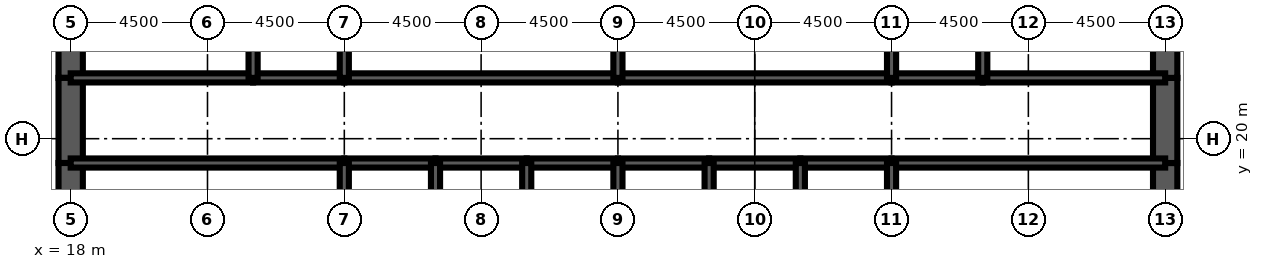
"""IFC4 building model, lengths in metres.
Left out: names, types, materials, properties, quantities, classifications, styles, units other than length and angle.
Written with IfcOpenShell. Run it as: python <this file> out.ifc"""

import sys

from ifc_helpers import new_model, si_unit, direction, frame, frame_2d, origin, place, context, subcontext, project, spatial, rectangle, extrude, element, fill, save


model = new_model("IFC4")
c1 = context("Model", 3, precision=1e-05, world=origin(), true_north=direction((0.0, 1.0)))
c2 = subcontext(c1, "Body", "Model", "MODEL_VIEW")
j1 = project(units=[si_unit("LENGTHUNIT", "METRE"), si_unit("PLANEANGLEUNIT", "RADIAN")], contexts=[c1])
p1 = place(None, origin())
s1 = spatial("IfcSite", under=j1, at=p1, CompositionType="ELEMENT")
p2 = place(p1, origin())
s2 = spatial("IfcBuilding", under=s1, at=p2, CompositionType="ELEMENT")
p3 = place(p2, frame((0.0, 0.0, 257.2)))
s3 = spatial("IfcBuildingStorey", under=s2, at=p3, CompositionType="ELEMENT", Elevation=257.2)
p4 = place(p3, frame((18.0, 26.0, 0.0), z_axis=(0.0, 0.0, 1.0), x_axis=(0.0, -1.0, 0.0)))
e1 = element("IfcWall", 1, at=p4, inside=s3, PredefinedType="SHEAR", context=c2, shape_type="SweptSolid", body=[
    extrude(rectangle(XDim=4.0, YDim=0.8, at=frame_2d((2.0, 0.0))), origin(), (0.0, 0.0, 1.0), 4.2),
])
p5 = place(p3, frame((18.0, 22.0, 0.0), z_axis=(0.0, 0.0, 1.0), x_axis=(0.0, -1.0, 0.0)))
e2 = element("IfcWall", 2, at=p5, inside=s3, PredefinedType="SHEAR", context=c2, shape_type="SweptSolid", body=[
    extrude(rectangle(XDim=2.8, YDim=0.8, at=frame_2d((1.4, 0.0))), origin(), (0.0, 0.0, 1.0), 4.2),
])
p6 = place(p5, frame((0.6, 0.0, 0.0)))
e3 = element("IfcOpeningElement", 3, at=p6, cuts=e2, PredefinedType="OPENING", context=c2, shape_type="SweptSolid", body=[
    extrude(rectangle(XDim=1.8, YDim=2.1, at=frame_2d((0.9, 1.05))), frame((0.0, 0.41, 0.0), z_axis=(0.0, -1.0, 0.0), x_axis=(1.0, 0.0, 0.0)), (0.0, 0.0, 1.0), 0.82),
])
for number, where, z_axis, x_axis in (
    (4, (18.0, 19.2, 0.0), (0.0, 0.0, 1.0), (0.0, -1.0, 0.0)),
    (5, (54.0, 16.0, 0.0), (0.0, 0.0, 1.0), (0.0, 1.0, 0.0)),
):
    element("IfcWall", number, at=place(p3, frame(where, z_axis=z_axis, x_axis=x_axis)), inside=s3, PredefinedType="SHEAR", context=c2, shape_type="SweptSolid", body=[
        extrude(rectangle(XDim=3.2, YDim=0.8, at=frame_2d((1.6, 0.0))), origin(), (0.0, 0.0, 1.0), 4.2),
    ])
p7 = place(p3, frame((54.0, 19.2, 0.0), z_axis=(0.0, 0.0, 1.0), x_axis=(0.0, 1.0, 0.0)))
e6 = element("IfcWall", 6, at=p7, inside=s3, PredefinedType="SHEAR", context=c2, shape_type="SweptSolid", body=[
    extrude(rectangle(XDim=2.8, YDim=0.8, at=frame_2d((1.4, 0.0))), origin(), (0.0, 0.0, 1.0), 4.2),
])
p8 = place(p7, frame((0.4, 0.0, 0.0)))
e7 = element("IfcOpeningElement", 7, at=p8, cuts=e6, PredefinedType="OPENING", context=c2, shape_type="SweptSolid", body=[
    extrude(rectangle(XDim=1.8, YDim=2.1, at=frame_2d((0.9, 1.05))), frame((0.0, 0.41, 0.0), z_axis=(0.0, -1.0, 0.0), x_axis=(1.0, 0.0, 0.0)), (0.0, 0.0, 1.0), 0.82),
])
p9 = place(p3, frame((54.0, 22.0, 0.0), z_axis=(0.0, 0.0, 1.0), x_axis=(0.0, 1.0, 0.0)))
e8 = element("IfcWall", 8, at=p9, inside=s3, PredefinedType="SHEAR", context=c2, shape_type="SweptSolid", body=[
    extrude(rectangle(XDim=4.0, YDim=0.8, at=frame_2d((2.0, 0.0))), origin(), (0.0, 0.0, 1.0), 4.2),
])
p10 = place(p3, frame((18.0, 19.2, 0.0), z_axis=(0.0, 0.0, 1.0), x_axis=(1.0, 0.0, 0.0)))
e9 = element("IfcWall", 9, at=p10, inside=s3, PredefinedType="SOLIDWALL", context=c2, shape_type="SweptSolid", body=[
    extrude(rectangle(XDim=9.0, YDim=0.3, at=frame_2d((4.5, 0.0))), origin(), (0.0, 0.0, 1.0), 4.2),
])
p11 = place(p10, frame((0.65, 0.0, 0.0)))
e10 = element("IfcOpeningElement", 10, at=p11, cuts=e9, PredefinedType="OPENING", context=c2, shape_type="SweptSolid", body=[
    extrude(rectangle(XDim=1.0, YDim=2.1, at=frame_2d((0.5, 1.05))), frame((0.0, 0.16, 0.0), z_axis=(0.0, -1.0, 0.0), x_axis=(1.0, 0.0, 0.0)), (0.0, 0.0, 1.0), 0.32),
])
p12 = place(p3, frame((27.0, 19.2, 0.0), z_axis=(0.0, 0.0, 1.0), x_axis=(1.0, 0.0, 0.0)))
e11 = element("IfcWall", 11, at=p12, inside=s3, PredefinedType="SOLIDWALL", context=c2, shape_type="SweptSolid", body=[
    extrude(rectangle(XDim=3.0, YDim=0.3, at=frame_2d((1.5, 0.0))), origin(), (0.0, 0.0, 1.0), 4.2),
])
p13 = place(p12, frame((0.95, 0.0, 0.0)))
e12 = element("IfcOpeningElement", 12, at=p13, cuts=e11, PredefinedType="OPENING", context=c2, shape_type="SweptSolid", body=[
    extrude(rectangle(XDim=1.1, YDim=2.2, at=frame_2d((0.55, 1.1))), frame((0.0, 0.16, 0.0), z_axis=(0.0, -1.0, 0.0), x_axis=(1.0, 0.0, 0.0)), (0.0, 0.0, 1.0), 0.32),
])
p14 = place(p3, frame((30.0, 19.2, 0.0), z_axis=(0.0, 0.0, 1.0), x_axis=(1.0, 0.0, 0.0)))
e13 = element("IfcWall", 13, at=p14, inside=s3, PredefinedType="SOLIDWALL", context=c2, shape_type="SweptSolid", body=[
    extrude(rectangle(XDim=3.0, YDim=0.3, at=frame_2d((1.5, 0.0))), origin(), (0.0, 0.0, 1.0), 4.2),
])
p15 = place(p14, frame((0.95, 0.0, 0.0)))
e14 = element("IfcOpeningElement", 14, at=p15, cuts=e13, PredefinedType="OPENING", context=c2, shape_type="SweptSolid", body=[
    extrude(rectangle(XDim=1.1, YDim=2.2, at=frame_2d((0.55, 1.1))), frame((0.0, 0.16, 0.0), z_axis=(0.0, -1.0, 0.0), x_axis=(1.0, 0.0, 0.0)), (0.0, 0.0, 1.0), 0.32),
])
p16 = place(p3, frame((33.0, 19.2, 0.0), z_axis=(0.0, 0.0, 1.0), x_axis=(1.0, 0.0, 0.0)))
e15 = element("IfcWall", 15, at=p16, inside=s3, PredefinedType="SOLIDWALL", context=c2, shape_type="SweptSolid", body=[
    extrude(rectangle(XDim=3.0, YDim=0.3, at=frame_2d((1.5, 0.0))), origin(), (0.0, 0.0, 1.0), 4.2),
])
p17 = place(p16, frame((0.95, 0.0, 0.0)))
e16 = element("IfcOpeningElement", 16, at=p17, cuts=e15, PredefinedType="OPENING", context=c2, shape_type="SweptSolid", body=[
    extrude(rectangle(XDim=1.1, YDim=2.2, at=frame_2d((0.55, 1.1))), frame((0.0, 0.16, 0.0), z_axis=(0.0, -1.0, 0.0), x_axis=(1.0, 0.0, 0.0)), (0.0, 0.0, 1.0), 0.32),
])
p18 = place(p3, frame((36.0, 19.2, 0.0), z_axis=(0.0, 0.0, 1.0), x_axis=(1.0, 0.0, 0.0)))
e17 = element("IfcWall", 17, at=p18, inside=s3, PredefinedType="SOLIDWALL", context=c2, shape_type="SweptSolid", body=[
    extrude(rectangle(XDim=3.0, YDim=0.3, at=frame_2d((1.5, 0.0))), origin(), (0.0, 0.0, 1.0), 4.2),
])
p19 = place(p18, frame((0.95, 0.0, 0.0)))
e18 = element("IfcOpeningElement", 18, at=p19, cuts=e17, PredefinedType="OPENING", context=c2, shape_type="SweptSolid", body=[
    extrude(rectangle(XDim=1.1, YDim=2.2, at=frame_2d((0.55, 1.1))), frame((0.0, 0.16, 0.0), z_axis=(0.0, -1.0, 0.0), x_axis=(1.0, 0.0, 0.0)), (0.0, 0.0, 1.0), 0.32),
])
p20 = place(p3, frame((39.0, 19.2, 0.0), z_axis=(0.0, 0.0, 1.0), x_axis=(1.0, 0.0, 0.0)))
e19 = element("IfcWall", 19, at=p20, inside=s3, PredefinedType="SOLIDWALL", context=c2, shape_type="SweptSolid", body=[
    extrude(rectangle(XDim=3.0, YDim=0.3, at=frame_2d((1.5, 0.0))), origin(), (0.0, 0.0, 1.0), 4.2),
])
p21 = place(p20, frame((1.0, 0.0, 0.0)))
e20 = element("IfcOpeningElement", 20, at=p21, cuts=e19, PredefinedType="OPENING", context=c2, shape_type="SweptSolid", body=[
    extrude(rectangle(XDim=1.0, YDim=2.1, at=frame_2d((0.5, 1.05))), frame((0.0, 0.16, 0.0), z_axis=(0.0, -1.0, 0.0), x_axis=(1.0, 0.0, 0.0)), (0.0, 0.0, 1.0), 0.32),
])
p22 = place(p3, frame((42.0, 19.2, 0.0), z_axis=(0.0, 0.0, 1.0), x_axis=(1.0, 0.0, 0.0)))
e21 = element("IfcWall", 21, at=p22, inside=s3, PredefinedType="SOLIDWALL", context=c2, shape_type="SweptSolid", body=[
    extrude(rectangle(XDim=3.0, YDim=0.3, at=frame_2d((1.5, 0.0))), origin(), (0.0, 0.0, 1.0), 4.2),
])
p23 = place(p22, frame((1.0, 0.0, 0.0)))
e22 = element("IfcOpeningElement", 22, at=p23, cuts=e21, PredefinedType="OPENING", context=c2, shape_type="SweptSolid", body=[
    extrude(rectangle(XDim=1.0, YDim=2.1, at=frame_2d((0.5, 1.05))), frame((0.0, 0.16, 0.0), z_axis=(0.0, -1.0, 0.0), x_axis=(1.0, 0.0, 0.0)), (0.0, 0.0, 1.0), 0.32),
])
p24 = place(p3, frame((45.0, 19.2, 0.0), z_axis=(0.0, 0.0, 1.0), x_axis=(1.0, 0.0, 0.0)))
e23 = element("IfcWall", 23, at=p24, inside=s3, PredefinedType="SOLIDWALL", context=c2, shape_type="SweptSolid", body=[
    extrude(rectangle(XDim=9.0, YDim=0.3, at=frame_2d((4.5, 0.0))), origin(), (0.0, 0.0, 1.0), 4.2),
])
p25 = place(p24, frame((7.35, 0.0, 0.0)))
e24 = element("IfcOpeningElement", 24, at=p25, cuts=e23, PredefinedType="OPENING", context=c2, shape_type="SweptSolid", body=[
    extrude(rectangle(XDim=1.0, YDim=2.1, at=frame_2d((0.5, 1.05))), frame((0.0, 0.16, 0.0), z_axis=(0.0, -1.0, 0.0), x_axis=(1.0, 0.0, 0.0)), (0.0, 0.0, 1.0), 0.32),
])
p26 = place(p3, frame((18.0, 22.0, 0.0), z_axis=(0.0, 0.0, 1.0), x_axis=(1.0, 0.0, 0.0)))
e25 = element("IfcWall", 25, at=p26, inside=s3, PredefinedType="SOLIDWALL", context=c2, shape_type="SweptSolid", body=[
    extrude(rectangle(XDim=6.0, YDim=0.3, at=frame_2d((3.0, 0.0))), origin(), (0.0, 0.0, 1.0), 4.2),
])
p27 = place(p26, frame((4.4, 0.0, 0.0)))
e26 = element("IfcOpeningElement", 26, at=p27, cuts=e25, PredefinedType="OPENING", context=c2, shape_type="SweptSolid", body=[
    extrude(rectangle(XDim=1.0, YDim=2.1, at=frame_2d((0.5, 1.05))), frame((0.0, 0.16, 0.0), z_axis=(0.0, -1.0, 0.0), x_axis=(1.0, 0.0, 0.0)), (0.0, 0.0, 1.0), 0.32),
])
p28 = place(p26, frame((0.8, 0.0, 0.0)))
e27 = element("IfcOpeningElement", 27, at=p28, cuts=e25, PredefinedType="OPENING", context=c2, shape_type="SweptSolid", body=[
    extrude(rectangle(XDim=1.0, YDim=2.1, at=frame_2d((0.5, 1.05))), frame((0.0, 0.16, 0.0), z_axis=(0.0, -1.0, 0.0), x_axis=(1.0, 0.0, 0.0)), (0.0, 0.0, 1.0), 0.32),
])
p29 = place(p3, frame((24.0, 22.0, 0.0), z_axis=(0.0, 0.0, 1.0), x_axis=(1.0, 0.0, 0.0)))
e28 = element("IfcWall", 28, at=p29, inside=s3, PredefinedType="SOLIDWALL", context=c2, shape_type="SweptSolid", body=[
    extrude(rectangle(XDim=3.0, YDim=0.3, at=frame_2d((1.5, 0.0))), origin(), (0.0, 0.0, 1.0), 4.2),
])
p30 = place(p29, frame((1.0, 0.0, 0.0)))
e29 = element("IfcOpeningElement", 29, at=p30, cuts=e28, PredefinedType="OPENING", context=c2, shape_type="SweptSolid", body=[
    extrude(rectangle(XDim=1.0, YDim=2.1, at=frame_2d((0.5, 1.05))), frame((0.0, 0.16, 0.0), z_axis=(0.0, -1.0, 0.0), x_axis=(1.0, 0.0, 0.0)), (0.0, 0.0, 1.0), 0.32),
])
p31 = place(p3, frame((27.0, 22.0, 0.0), z_axis=(0.0, 0.0, 1.0), x_axis=(1.0, 0.0, 0.0)))
e30 = element("IfcWall", 30, at=p31, inside=s3, PredefinedType="SOLIDWALL", context=c2, shape_type="SweptSolid", body=[
    extrude(rectangle(XDim=9.0, YDim=0.3, at=frame_2d((4.5, 0.0))), origin(), (0.0, 0.0, 1.0), 4.2),
])
p32 = place(p31, frame((4.0, 0.0, 0.0)))
e31 = element("IfcOpeningElement", 31, at=p32, cuts=e30, PredefinedType="OPENING", context=c2, shape_type="SweptSolid", body=[
    extrude(rectangle(XDim=1.0, YDim=2.1, at=frame_2d((0.5, 1.05))), frame((0.0, 0.16, 0.0), z_axis=(0.0, -1.0, 0.0), x_axis=(1.0, 0.0, 0.0)), (0.0, 0.0, 1.0), 0.32),
])
p33 = place(p3, frame((36.0, 22.0, 0.0), z_axis=(0.0, 0.0, 1.0), x_axis=(1.0, 0.0, 0.0)))
e32 = element("IfcWall", 32, at=p33, inside=s3, PredefinedType="SOLIDWALL", context=c2, shape_type="SweptSolid", body=[
    extrude(rectangle(XDim=9.0, YDim=0.3, at=frame_2d((4.5, 0.0))), origin(), (0.0, 0.0, 1.0), 4.2),
])
p34 = place(p33, frame((4.0, 0.0, 0.0)))
e33 = element("IfcOpeningElement", 33, at=p34, cuts=e32, PredefinedType="OPENING", context=c2, shape_type="SweptSolid", body=[
    extrude(rectangle(XDim=1.0, YDim=2.1, at=frame_2d((0.5, 1.05))), frame((0.0, 0.16, 0.0), z_axis=(0.0, -1.0, 0.0), x_axis=(1.0, 0.0, 0.0)), (0.0, 0.0, 1.0), 0.32),
])
p35 = place(p3, frame((45.0, 22.0, 0.0), z_axis=(0.0, 0.0, 1.0), x_axis=(1.0, 0.0, 0.0)))
e34 = element("IfcWall", 34, at=p35, inside=s3, PredefinedType="SOLIDWALL", context=c2, shape_type="SweptSolid", body=[
    extrude(rectangle(XDim=3.0, YDim=0.3, at=frame_2d((1.5, 0.0))), origin(), (0.0, 0.0, 1.0), 4.2),
])
p36 = place(p35, frame((1.0, 0.0, 0.0)))
e35 = element("IfcOpeningElement", 35, at=p36, cuts=e34, PredefinedType="OPENING", context=c2, shape_type="SweptSolid", body=[
    extrude(rectangle(XDim=1.0, YDim=2.1, at=frame_2d((0.5, 1.05))), frame((0.0, 0.16, 0.0), z_axis=(0.0, -1.0, 0.0), x_axis=(1.0, 0.0, 0.0)), (0.0, 0.0, 1.0), 0.32),
])
p37 = place(p3, frame((48.0, 22.0, 0.0), z_axis=(0.0, 0.0, 1.0), x_axis=(1.0, 0.0, 0.0)))
e36 = element("IfcWall", 36, at=p37, inside=s3, PredefinedType="SOLIDWALL", context=c2, shape_type="SweptSolid", body=[
    extrude(rectangle(XDim=6.0, YDim=0.3, at=frame_2d((3.0, 0.0))), origin(), (0.0, 0.0, 1.0), 4.2),
])
p38 = place(p37, frame((2.0, 0.0, 0.0)))
e37 = element("IfcOpeningElement", 37, at=p38, cuts=e36, PredefinedType="OPENING", context=c2, shape_type="SweptSolid", body=[
    extrude(rectangle(XDim=1.0, YDim=2.1, at=frame_2d((0.5, 1.05))), frame((0.0, 0.16, 0.0), z_axis=(0.0, -1.0, 0.0), x_axis=(1.0, 0.0, 0.0)), (0.0, 0.0, 1.0), 0.32),
])
p39 = place(p37, frame((4.05, 0.0, 0.0)))
e38 = element("IfcOpeningElement", 38, at=p39, cuts=e36, PredefinedType="OPENING", context=c2, shape_type="SweptSolid", body=[
    extrude(rectangle(XDim=1.0, YDim=2.1, at=frame_2d((0.5, 1.05))), frame((0.0, 0.16, 0.0), z_axis=(0.0, -1.0, 0.0), x_axis=(1.0, 0.0, 0.0)), (0.0, 0.0, 1.0), 0.32),
])
for number, where, z_axis, x_axis in (
    (39, (27.0, 16.0, 0.0), (0.0, 0.0, 1.0), (0.0, 1.0, 0.0)),
    (40, (30.0, 16.0, 0.0), (0.0, 0.0, 1.0), (0.0, 1.0, 0.0)),
    (41, (33.0, 16.0, 0.0), (0.0, 0.0, 1.0), (0.0, 1.0, 0.0)),
    (42, (36.0, 16.0, 0.0), (0.0, 0.0, 1.0), (0.0, 1.0, 0.0)),
    (43, (39.0, 16.0, 0.0), (0.0, 0.0, 1.0), (0.0, 1.0, 0.0)),
    (44, (42.0, 16.0, 0.0), (0.0, 0.0, 1.0), (0.0, 1.0, 0.0)),
    (45, (45.0, 16.0, 0.0), (0.0, 0.0, 1.0), (0.0, 1.0, 0.0)),
):
    element("IfcWall", number, at=place(p3, frame(where, z_axis=z_axis, x_axis=x_axis)), inside=s3, PredefinedType="SOLIDWALL", context=c2, shape_type="SweptSolid", body=[
        extrude(rectangle(XDim=3.2, YDim=0.3, at=frame_2d((1.6, 0.0))), origin(), (0.0, 0.0, 1.0), 4.2),
    ])
for number, where, z_axis, x_axis in (
    (46, (24.0, 22.0, 0.0), (0.0, 0.0, 1.0), (0.0, 1.0, 0.0)),
    (47, (27.0, 22.0, 0.0), (0.0, 0.0, 1.0), (0.0, 1.0, 0.0)),
    (48, (36.0, 22.0, 0.0), (0.0, 0.0, 1.0), (0.0, 1.0, 0.0)),
    (49, (45.0, 22.0, 0.0), (0.0, 0.0, 1.0), (0.0, 1.0, 0.0)),
    (50, (48.0, 22.0, 0.0), (0.0, 0.0, 1.0), (0.0, 1.0, 0.0)),
):
    element("IfcWall", number, at=place(p3, frame(where, z_axis=z_axis, x_axis=x_axis)), inside=s3, PredefinedType="SOLIDWALL", context=c2, shape_type="SweptSolid", body=[
        extrude(rectangle(XDim=4.0, YDim=0.3, at=frame_2d((2.0, 0.0))), origin(), (0.0, 0.0, 1.0), 4.2),
    ])
p40 = place(p3, frame((38.0, 22.15, 0.0), z_axis=(0.0, 0.0, 1.0), x_axis=(0.0, 1.0, 0.0)))
e51 = element("IfcWall", 51, at=p40, inside=s3, PredefinedType="PARTITIONING", context=c2, shape_type="SweptSolid", body=[
    extrude(rectangle(XDim=3.7, YDim=0.15, at=frame_2d((1.85, 0.0))), origin(), (0.0, 0.0, 1.0), 3.0),
])
p41 = place(p40, frame((2.2, 0.0, 0.0)))
e52 = element("IfcOpeningElement", 52, at=p41, cuts=e51, PredefinedType="OPENING", context=c2, shape_type="SweptSolid", body=[
    extrude(rectangle(XDim=1.0, YDim=2.1, at=frame_2d((0.5, 1.05))), frame((0.0, 0.085, 0.0), z_axis=(0.0, -1.0, 0.0), x_axis=(1.0, 0.0, 0.0)), (0.0, 0.0, 1.0), 0.17),
])
for number, where, z_axis, x_axis in (
    (53, (20.275, 22.15, 0.0), (0.0, 0.0, 1.0), (0.0, 1.0, 0.0)),
    (54, (51.425, 22.15, 0.0), (0.0, 0.0, 1.0), (0.0, 1.0, 0.0)),
):
    element("IfcWall", number, at=place(p3, frame(where, z_axis=z_axis, x_axis=x_axis)), inside=s3, PredefinedType="PARTITIONING", context=c2, shape_type="SweptSolid", body=[
        extrude(rectangle(XDim=3.7, YDim=0.15, at=frame_2d((1.85, 0.0))), origin(), (0.0, 0.0, 1.0), 3.0),
    ])
p42 = place(p13, origin())
e55 = element("IfcDoor", 55, at=p42, inside=s3, OperationType="DOUBLE_DOOR_SLIDING", PredefinedType="USERDEFINED", context=c2, shape_type="SweptSolid", body=[
    extrude(rectangle(XDim=1.1, YDim=2.2, at=frame_2d((0.55, 1.1))), frame((0.0, 0.025, 0.0), z_axis=(0.0, -1.0, 0.0), x_axis=(1.0, 0.0, 0.0)), (0.0, 0.0, 1.0), 0.05),
])
fill(e12, e55)
p43 = place(p15, origin())
e56 = element("IfcDoor", 56, at=p43, inside=s3, OperationType="DOUBLE_DOOR_SLIDING", PredefinedType="USERDEFINED", context=c2, shape_type="SweptSolid", body=[
    extrude(rectangle(XDim=1.1, YDim=2.2, at=frame_2d((0.55, 1.1))), frame((0.0, 0.025, 0.0), z_axis=(0.0, -1.0, 0.0), x_axis=(1.0, 0.0, 0.0)), (0.0, 0.0, 1.0), 0.05),
])
fill(e14, e56)
p44 = place(p17, origin())
e57 = element("IfcDoor", 57, at=p44, inside=s3, OperationType="DOUBLE_DOOR_SLIDING", PredefinedType="USERDEFINED", context=c2, shape_type="SweptSolid", body=[
    extrude(rectangle(XDim=1.1, YDim=2.2, at=frame_2d((0.55, 1.1))), frame((0.0, 0.025, 0.0), z_axis=(0.0, -1.0, 0.0), x_axis=(1.0, 0.0, 0.0)), (0.0, 0.0, 1.0), 0.05),
])
fill(e16, e57)
p45 = place(p19, origin())
e58 = element("IfcDoor", 58, at=p45, inside=s3, OperationType="DOUBLE_DOOR_SLIDING", PredefinedType="USERDEFINED", context=c2, shape_type="SweptSolid", body=[
    extrude(rectangle(XDim=1.1, YDim=2.2, at=frame_2d((0.55, 1.1))), frame((0.0, 0.025, 0.0), z_axis=(0.0, -1.0, 0.0), x_axis=(1.0, 0.0, 0.0)), (0.0, 0.0, 1.0), 0.05),
])
fill(e18, e58)
p46 = place(p11, origin())
e59 = element("IfcDoor", 59, at=p46, inside=s3, OperationType="SINGLE_SWING_LEFT", PredefinedType="DOOR", context=c2, shape_type="SweptSolid", body=[
    extrude(rectangle(XDim=1.0, YDim=2.1, at=frame_2d((0.5, 1.05))), frame((0.0, 0.025, 0.0), z_axis=(0.0, -1.0, 0.0), x_axis=(1.0, 0.0, 0.0)), (0.0, 0.0, 1.0), 0.05),
])
fill(e10, e59)
p47 = place(p25, origin())
e60 = element("IfcDoor", 60, at=p47, inside=s3, OperationType="SINGLE_SWING_RIGHT", PredefinedType="DOOR", context=c2, shape_type="SweptSolid", body=[
    extrude(rectangle(XDim=1.0, YDim=2.1, at=frame_2d((0.5, 1.05))), frame((0.0, 0.025, 0.0), z_axis=(0.0, -1.0, 0.0), x_axis=(1.0, 0.0, 0.0)), (0.0, 0.0, 1.0), 0.05),
])
fill(e24, e60)
p48 = place(p6, origin())
e61 = element("IfcDoor", 61, at=p48, inside=s3, OperationType="SINGLE_SWING_LEFT", PredefinedType="DOOR", context=c2, shape_type="SweptSolid", body=[
    extrude(rectangle(XDim=1.8, YDim=2.1, at=frame_2d((0.9, 1.05))), frame((0.0, 0.4, 0.0), z_axis=(0.0, -1.0, 0.0), x_axis=(1.0, 0.0, 0.0)), (0.0, 0.0, 1.0), 0.8),
])
fill(e3, e61)
p49 = place(p8, origin())
e62 = element("IfcDoor", 62, at=p49, inside=s3, OperationType="SINGLE_SWING_LEFT", PredefinedType="DOOR", context=c2, shape_type="SweptSolid", body=[
    extrude(rectangle(XDim=1.8, YDim=2.1, at=frame_2d((0.9, 1.05))), frame((0.0, 0.4, 0.0), z_axis=(0.0, -1.0, 0.0), x_axis=(1.0, 0.0, 0.0)), (0.0, 0.0, 1.0), 0.8),
])
fill(e7, e62)
p50 = place(p27, origin())
e63 = element("IfcDoor", 63, at=p50, inside=s3, OperationType="SINGLE_SWING_RIGHT", PredefinedType="DOOR", context=c2, shape_type="SweptSolid", body=[
    extrude(rectangle(XDim=1.0, YDim=2.1, at=frame_2d((0.5, 1.05))), frame((0.0, 0.025, 0.0), z_axis=(0.0, -1.0, 0.0), x_axis=(1.0, 0.0, 0.0)), (0.0, 0.0, 1.0), 0.05),
])
fill(e26, e63)
p51 = place(p30, origin())
e64 = element("IfcDoor", 64, at=p51, inside=s3, OperationType="SINGLE_SWING_LEFT", PredefinedType="DOOR", context=c2, shape_type="SweptSolid", body=[
    extrude(rectangle(XDim=1.0, YDim=2.1, at=frame_2d((0.5, 1.05))), frame((0.0, 0.025, 0.0), z_axis=(0.0, -1.0, 0.0), x_axis=(1.0, 0.0, 0.0)), (0.0, 0.0, 1.0), 0.05),
])
fill(e29, e64)
p52 = place(p32, origin())
e65 = element("IfcDoor", 65, at=p52, inside=s3, OperationType="SINGLE_SWING_LEFT", PredefinedType="DOOR", context=c2, shape_type="SweptSolid", body=[
    extrude(rectangle(XDim=1.0, YDim=2.1, at=frame_2d((0.5, 1.05))), frame((0.0, 0.025, 0.0), z_axis=(0.0, -1.0, 0.0), x_axis=(1.0, 0.0, 0.0)), (0.0, 0.0, 1.0), 0.05),
])
fill(e31, e65)
p53 = place(p34, origin())
e66 = element("IfcDoor", 66, at=p53, inside=s3, OperationType="SINGLE_SWING_LEFT", PredefinedType="DOOR", context=c2, shape_type="SweptSolid", body=[
    extrude(rectangle(XDim=1.0, YDim=2.1, at=frame_2d((0.5, 1.05))), frame((0.0, 0.025, 0.0), z_axis=(0.0, -1.0, 0.0), x_axis=(1.0, 0.0, 0.0)), (0.0, 0.0, 1.0), 0.05),
])
fill(e33, e66)
p54 = place(p36, origin())
e67 = element("IfcDoor", 67, at=p54, inside=s3, OperationType="SINGLE_SWING_LEFT", PredefinedType="DOOR", context=c2, shape_type="SweptSolid", body=[
    extrude(rectangle(XDim=1.0, YDim=2.1, at=frame_2d((0.5, 1.05))), frame((0.0, 0.025, 0.0), z_axis=(0.0, -1.0, 0.0), x_axis=(1.0, 0.0, 0.0)), (0.0, 0.0, 1.0), 0.05),
])
fill(e35, e67)
p55 = place(p38, origin())
e68 = element("IfcDoor", 68, at=p55, inside=s3, OperationType="SINGLE_SWING_LEFT", PredefinedType="DOOR", context=c2, shape_type="SweptSolid", body=[
    extrude(rectangle(XDim=1.0, YDim=2.1, at=frame_2d((0.5, 1.05))), frame((0.0, 0.025, 0.0), z_axis=(0.0, -1.0, 0.0), x_axis=(1.0, 0.0, 0.0)), (0.0, 0.0, 1.0), 0.05),
])
fill(e37, e68)
p56 = place(p28, origin())
e69 = element("IfcDoor", 69, at=p56, inside=s3, OperationType="SINGLE_SWING_LEFT", PredefinedType="DOOR", context=c2, shape_type="SweptSolid", body=[
    extrude(rectangle(XDim=1.0, YDim=2.1, at=frame_2d((0.5, 1.05))), frame((0.0, 0.025, 0.0), z_axis=(0.0, -1.0, 0.0), x_axis=(1.0, 0.0, 0.0)), (0.0, 0.0, 1.0), 0.05),
])
fill(e27, e69)
p57 = place(p39, origin())
e70 = element("IfcDoor", 70, at=p57, inside=s3, OperationType="SINGLE_SWING_RIGHT", PredefinedType="DOOR", context=c2, shape_type="SweptSolid", body=[
    extrude(rectangle(XDim=1.0, YDim=2.1, at=frame_2d((0.5, 1.05))), frame((0.0, 0.025, 0.0), z_axis=(0.0, -1.0, 0.0), x_axis=(1.0, 0.0, 0.0)), (0.0, 0.0, 1.0), 0.05),
])
fill(e38, e70)
p58 = place(p21, origin())
e71 = element("IfcDoor", 71, at=p58, inside=s3, OperationType="SINGLE_SWING_LEFT", PredefinedType="DOOR", context=c2, shape_type="SweptSolid", body=[
    extrude(rectangle(XDim=1.0, YDim=2.1, at=frame_2d((0.5, 1.05))), frame((0.0, 0.025, 0.0), z_axis=(0.0, -1.0, 0.0), x_axis=(1.0, 0.0, 0.0)), (0.0, 0.0, 1.0), 0.05),
])
fill(e20, e71)
p59 = place(p23, origin())
e72 = element("IfcDoor", 72, at=p59, inside=s3, OperationType="SINGLE_SWING_LEFT", PredefinedType="DOOR", context=c2, shape_type="SweptSolid", body=[
    extrude(rectangle(XDim=1.0, YDim=2.1, at=frame_2d((0.5, 1.05))), frame((0.0, 0.025, 0.0), z_axis=(0.0, -1.0, 0.0), x_axis=(1.0, 0.0, 0.0)), (0.0, 0.0, 1.0), 0.05),
])
fill(e22, e72)
save(model, sys.argv[1])
